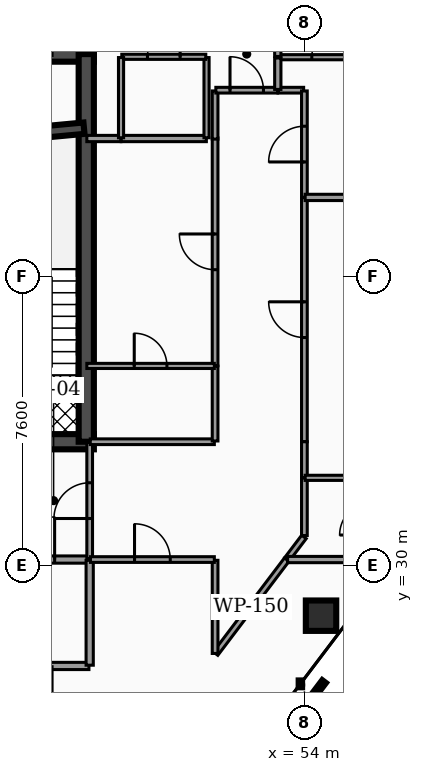
"""IFC4 building model, lengths in metres.
Left out: names, types, materials, properties, quantities, classifications, styles, units other than length and angle.
Written with IfcOpenShell. Run it as: python <this file> out.ifc"""

import sys

from ifc_helpers import new_model, si_unit, direction, frame, frame_2d, origin, origin_2d, place, context, subcontext, project, spatial, rectangle, hollow_rectangle, extrude, element, fill, save


model = new_model("IFC4")
c1 = context("Model", 3, precision=1e-05, world=origin(), true_north=direction((0.0, 1.0)))
c2 = subcontext(c1, "Body", "Model", "MODEL_VIEW")
j1 = project(units=[si_unit("LENGTHUNIT", "METRE"), si_unit("PLANEANGLEUNIT", "RADIAN")], contexts=[c1])
p1 = place(None, origin())
s1 = spatial("IfcSite", under=j1, at=p1, CompositionType="ELEMENT")
p2 = place(p1, origin())
s2 = spatial("IfcBuilding", under=s1, at=p2, CompositionType="ELEMENT")
p3 = place(p2, frame((0.0, 0.0, 123.42)))
s3 = spatial("IfcBuildingStorey", under=s2, at=p3, CompositionType="ELEMENT", Elevation=123.42)
p4 = place(p3, frame((28.4, 43.45, 0.0), z_axis=(0.0, 0.0, 1.0), x_axis=(1.0, 0.0, 0.0)))
e1 = element("IfcWall", 1, at=p4, inside=s3, PredefinedType="SHEAR", context=c2, shape_type="SweptSolid", body=[
    extrude(rectangle(XDim=20.06, YDim=0.4, at=frame_2d((10.03, 0.0))), origin(), (0.0, 0.0, 1.0), 3.5),
])
p5 = place(p3, frame((28.4, 33.25, 0.0), z_axis=(0.0, 0.0, 1.0), x_axis=(1.0, 0.0, 0.0)))
e2 = element("IfcWall", 2, at=p5, inside=s3, PredefinedType="SHEAR", context=c2, shape_type="SweptSolid", body=[
    extrude(rectangle(XDim=20.06, YDim=0.4, at=frame_2d((10.03, 0.0))), origin(), (0.0, 0.0, 1.0), 3.5),
])
p6 = place(p5, frame((4.03, 0.0, 0.0)))
e3 = element("IfcOpeningElement", 3, at=p6, cuts=e2, PredefinedType="OPENING", context=c2, shape_type="SweptSolid", body=[
    extrude(rectangle(XDim=1.1, YDim=2.15, at=frame_2d((0.55, 1.075))), frame((0.0, 0.21, 0.0), z_axis=(0.0, -1.0, 0.0), x_axis=(1.0, 0.0, 0.0)), (0.0, 0.0, 1.0), 0.42),
])
p7 = place(p5, frame((14.87, 0.0, 0.0)))
e4 = element("IfcOpeningElement", 4, at=p7, cuts=e2, PredefinedType="OPENING", context=c2, shape_type="SweptSolid", body=[
    extrude(rectangle(XDim=1.1, YDim=2.15, at=frame_2d((0.55, 1.075))), frame((0.0, 0.21, 0.0), z_axis=(0.0, -1.0, 0.0), x_axis=(1.0, 0.0, 0.0)), (0.0, 0.0, 1.0), 0.42),
])
p8 = place(p5, frame((5.95, 0.0, 0.0)))
e5 = element("IfcOpeningElement", 5, at=p8, cuts=e2, PredefinedType="OPENING", context=c2, shape_type="SweptSolid", body=[
    extrude(rectangle(XDim=1.0, YDim=2.1, at=frame_2d((0.5, 1.05))), frame((0.0, 0.21, 0.0), z_axis=(0.0, -1.0, 0.0), x_axis=(1.0, 0.0, 0.0)), (0.0, 0.0, 1.0), 0.42),
])
p9 = place(p5, frame((7.65, 0.0, 0.0)))
e6 = element("IfcOpeningElement", 6, at=p9, cuts=e2, PredefinedType="OPENING", context=c2, shape_type="SweptSolid", body=[
    extrude(rectangle(XDim=1.0, YDim=2.1, at=frame_2d((0.5, 1.05))), frame((0.0, 0.21, 0.0), z_axis=(0.0, -1.0, 0.0), x_axis=(1.0, 0.0, 0.0)), (0.0, 0.0, 1.0), 0.42),
])
p10 = place(p5, frame((1.31, 0.0, 0.0)))
e7 = element("IfcOpeningElement", 7, at=p10, cuts=e2, PredefinedType="OPENING", context=c2, shape_type="SweptSolid", body=[
    extrude(rectangle(XDim=1.1, YDim=2.2, at=frame_2d((0.55, 1.1))), frame((0.0, 0.21, 0.0), z_axis=(0.0, -1.0, 0.0), x_axis=(1.0, 0.0, 0.0)), (0.0, 0.0, 1.0), 0.42),
])
p11 = place(p5, frame((9.44, 0.0, 0.0)))
e8 = element("IfcOpeningElement", 8, at=p11, cuts=e2, PredefinedType="OPENING", context=c2, shape_type="SweptSolid", body=[
    extrude(rectangle(XDim=1.12, YDim=2.05, at=frame_2d((0.56, 1.025))), frame((0.0, 0.21, 0.0), z_axis=(0.0, -1.0, 0.0), x_axis=(1.0, 0.0, 0.0)), (0.0, 0.0, 1.0), 0.42),
])
p12 = place(p5, frame((17.65, 0.0, 0.0)))
e9 = element("IfcOpeningElement", 9, at=p12, cuts=e2, PredefinedType="OPENING", context=c2, shape_type="SweptSolid", body=[
    extrude(rectangle(XDim=1.1, YDim=2.2, at=frame_2d((0.55, 1.1))), frame((0.0, 0.21, 0.0), z_axis=(0.0, -1.0, 0.0), x_axis=(1.0, 0.0, 0.0)), (0.0, 0.0, 1.0), 0.42),
])
p13 = place(p3, frame((48.26, 33.25, 0.0), z_axis=(0.0, 0.0, 1.0), x_axis=(0.0, 1.0, 0.0)))
e10 = element("IfcWall", 10, at=p13, inside=s3, PredefinedType="SHEAR", context=c2, shape_type="SweptSolid", body=[
    extrude(rectangle(XDim=10.2, YDim=0.4, at=frame_2d((5.1, 0.0))), origin(), (0.0, 0.0, 1.0), 3.5),
])
p14 = place(p3, frame((44.98, 41.2, 0.0), z_axis=(0.0, 0.0, 1.0), x_axis=(0.995686468965, 0.09278176286, 0.0)))
e11 = element("IfcWall", 11, at=p14, inside=s3, PredefinedType="SHEAR", context=c2, shape_type="SweptSolid", body=[
    extrude(rectangle(XDim=3.234, YDim=0.3, at=frame_2d((1.617, 0.0))), origin(), (0.0, 0.0, 1.0), 3.5),
])
p15 = place(p3, frame((54.438, 28.673, 0.0), z_axis=(0.0, 0.0, 1.0), x_axis=(1.0, 0.0, 0.0)))
e12 = element("IfcColumn", 12, at=p15, inside=s3, PredefinedType="COLUMN", context=c2, shape_type="SweptSolid", body=[
    extrude(hollow_rectangle(XDim=0.8, YDim=0.8, WallThickness=0.04, at=origin_2d()), origin(), (0.0, 0.0, 1.0), 3.5),
])
p16 = place(p3, frame((45.405, 30.15, 0.0), z_axis=(0.0, 0.0, 1.0), x_axis=(1.0, 0.0, 0.0)))
e13 = element("IfcWall", 13, at=p16, inside=s3, PredefinedType="PARTITIONING", context=c2, shape_type="SweptSolid", body=[
    extrude(rectangle(XDim=2.925, YDim=0.19, at=frame_2d((1.462, 0.0))), origin(), (0.0, 0.0, 1.0), 2.457),
])
p17 = place(p16, frame((0.903, 0.0, 0.0)))
e14 = element("IfcOpeningElement", 14, at=p17, cuts=e13, PredefinedType="OPENING", context=c2, shape_type="SweptSolid", body=[
    extrude(rectangle(XDim=1.12, YDim=2.05, at=frame_2d((0.56, 1.025))), frame((0.0, 0.105, 0.0), z_axis=(0.0, -1.0, 0.0), x_axis=(1.0, 0.0, 0.0)), (0.0, 0.0, 1.0), 0.21),
])
p18 = place(p3, frame((48.35, 30.17, 0.0), z_axis=(0.0, 0.0, 1.0), x_axis=(0.0, 1.0, 0.0)))
e15 = element("IfcWall", 15, at=p18, inside=s3, PredefinedType="PARTITIONING", context=c2, shape_type="SweptSolid", body=[
    extrude(rectangle(XDim=3.06, YDim=0.15, at=frame_2d((1.53, 0.0))), origin(), (0.0, 0.0, 1.0), 2.457),
])
p19 = place(p18, frame((1.06, 0.0, 0.0)))
e16 = element("IfcOpeningElement", 16, at=p19, cuts=e15, PredefinedType="OPENING", context=c2, shape_type="SweptSolid", body=[
    extrude(rectangle(XDim=0.94, YDim=2.05, at=frame_2d((0.47, 1.025))), frame((0.0, 0.085, 0.0), z_axis=(0.0, -1.0, 0.0), x_axis=(1.0, 0.0, 0.0)), (0.0, 0.0, 1.0), 0.17),
])
p20 = place(p3, frame((47.305, 27.35, 0.0), z_axis=(0.0, 0.0, 1.0), x_axis=(1.0, 0.0, 0.0)))
e17 = element("IfcWall", 17, at=p20, inside=s3, PredefinedType="PARTITIONING", context=c2, shape_type="SweptSolid", body=[
    extrude(rectangle(XDim=1.025, YDim=0.19, at=frame_2d((0.513, 0.0))), origin(), (0.0, 0.0, 1.0), 2.457),
])
p21 = place(p3, frame((48.35, 27.37, 0.0), z_axis=(0.0, 0.0, 1.0), x_axis=(0.0, 1.0, 0.0)))
e18 = element("IfcWall", 18, at=p21, inside=s3, PredefinedType="PARTITIONING", context=c2, shape_type="SweptSolid", body=[
    extrude(rectangle(XDim=2.76, YDim=0.19, at=frame_2d((1.38, 0.0))), origin(), (0.0, 0.0, 1.0), 2.457),
])
p22 = place(p3, frame((51.662, 27.675, 0.0), z_axis=(0.0, 0.0, 1.0), x_axis=(0.603831940294, 0.797111653334, 0.0)))
e19 = element("IfcWall", 19, at=p22, inside=s3, PredefinedType="PARTITIONING", context=c2, shape_type="SweptSolid", body=[
    extrude(rectangle(XDim=3.104, YDim=0.15, at=frame_2d((1.552, 0.0))), origin(), (0.0, 0.0, 1.0), 2.457),
])
p23 = place(p3, frame((51.65, 27.679, 0.0), z_axis=(0.0, 0.0, 1.0), x_axis=(0.0, 1.0, 0.0)))
e20 = element("IfcWall", 20, at=p23, inside=s3, PredefinedType="PARTITIONING", context=c2, shape_type="SweptSolid", body=[
    extrude(rectangle(XDim=2.451, YDim=0.15, at=frame_2d((1.225, 0.0))), origin(), (0.0, 0.0, 1.0), 2.457),
])
p24 = place(p3, frame((48.37, 30.15, 0.0), z_axis=(0.0, 0.0, 1.0), x_axis=(1.0, 0.0, 0.0)))
e21 = element("IfcWall", 21, at=p24, inside=s3, PredefinedType="PARTITIONING", context=c2, shape_type="SweptSolid", body=[
    extrude(rectangle(XDim=3.26, YDim=0.15, at=frame_2d((1.63, 0.0))), origin(), (0.0, 0.0, 1.0), 2.457),
])
p25 = place(p24, frame((1.16, 0.0, 0.0)))
e22 = element("IfcOpeningElement", 22, at=p25, cuts=e21, PredefinedType="OPENING", context=c2, shape_type="SweptSolid", body=[
    extrude(rectangle(XDim=0.94, YDim=2.05, at=frame_2d((0.47, 1.025))), frame((0.0, 0.085, 0.0), z_axis=(0.0, -1.0, 0.0), x_axis=(1.0, 0.0, 0.0)), (0.0, 0.0, 1.0), 0.17),
])
p26 = place(p3, frame((54.0, 33.25, 0.0), z_axis=(0.0, 0.0, 1.0), x_axis=(0.0, 1.0, 0.0)))
e23 = element("IfcWall", 23, at=p26, inside=s3, PredefinedType="PARTITIONING", context=c2, shape_type="SweptSolid", body=[
    extrude(rectangle(XDim=6.423, YDim=0.15, at=frame_2d((3.212, 0.0))), origin(), (0.0, 0.0, 1.0), 2.457),
])
p27 = place(p26, frame((2.742, 0.0, 0.0)))
e24 = element("IfcOpeningElement", 24, at=p27, cuts=e23, PredefinedType="OPENING", context=c2, shape_type="SweptSolid", body=[
    extrude(rectangle(XDim=0.94, YDim=2.05, at=frame_2d((0.47, 1.025))), frame((0.0, 0.085, 0.0), z_axis=(0.0, -1.0, 0.0), x_axis=(1.0, 0.0, 0.0)), (0.0, 0.0, 1.0), 0.17),
])
p28 = place(p3, frame((54.0, 32.305, 0.0), z_axis=(0.0, 0.0, 1.0), x_axis=(0.0, 1.0, 0.0)))
e25 = element("IfcWall", 25, at=p28, inside=s3, PredefinedType="PARTITIONING", context=c2, shape_type="SweptSolid", body=[
    extrude(rectangle(XDim=0.945, YDim=0.15, at=frame_2d((0.473, 0.0))), origin(), (0.0, 0.0, 1.0), 2.457),
])
p29 = place(p3, frame((54.0, 30.781, 0.0), z_axis=(0.0, 0.0, 1.0), x_axis=(0.0, 1.0, 0.0)))
e26 = element("IfcWall", 26, at=p29, inside=s3, PredefinedType="PARTITIONING", context=c2, shape_type="SweptSolid", body=[
    extrude(rectangle(XDim=1.514, YDim=0.15, at=frame_2d((0.757, 0.0))), origin(), (0.0, 0.0, 1.0), 2.457),
])
p30 = place(p3, frame((53.54, 30.154, 0.0), z_axis=(0.0, 0.0, 1.0), x_axis=(0.603680225987, 0.797226557982, 0.0)))
e27 = element("IfcWall", 27, at=p30, inside=s3, PredefinedType="PARTITIONING", context=c2, shape_type="SweptSolid", body=[
    extrude(rectangle(XDim=0.742, YDim=0.15, at=frame_2d((0.371, 0.0))), origin(), (0.0, 0.0, 1.0), 2.457),
])
p31 = place(p3, frame((53.305, 42.5, 0.0), z_axis=(0.0, 0.0, 1.0), x_axis=(1.0, 0.0, 0.0)))
e28 = element("IfcWall", 28, at=p31, inside=s3, PredefinedType="PARTITIONING", context=c2, shape_type="SweptSolid", body=[
    extrude(rectangle(XDim=0.675, YDim=0.15, at=frame_2d((0.337, 0.0))), origin(), (0.0, 0.0, 1.0), 2.457),
])
p32 = place(p3, frame((54.0, 39.683, 0.0), z_axis=(0.0, 0.0, 1.0), x_axis=(0.0, 1.0, 0.0)))
e29 = element("IfcWall", 29, at=p32, inside=s3, PredefinedType="PARTITIONING", context=c2, shape_type="SweptSolid", body=[
    extrude(rectangle(XDim=2.797, YDim=0.15, at=frame_2d((1.398, 0.0))), origin(), (0.0, 0.0, 1.0), 2.457),
])
p33 = place(p32, frame((0.928, 0.0, 0.0)))
e30 = element("IfcOpeningElement", 30, at=p33, cuts=e29, PredefinedType="OPENING", context=c2, shape_type="SweptSolid", body=[
    extrude(rectangle(XDim=0.94, YDim=2.05, at=frame_2d((0.47, 1.025))), frame((0.0, 0.085, 0.0), z_axis=(0.0, -1.0, 0.0), x_axis=(1.0, 0.0, 0.0)), (0.0, 0.0, 1.0), 0.17),
])
p34 = place(p3, frame((51.65, 35.25, 0.0), z_axis=(0.0, 0.0, 1.0), x_axis=(0.0, 1.0, 0.0)))
e31 = element("IfcWall", 31, at=p34, inside=s3, PredefinedType="PARTITIONING", context=c2, shape_type="SweptSolid", body=[
    extrude(rectangle(XDim=5.994, YDim=0.15, at=frame_2d((2.997, 0.0))), origin(), (0.0, 0.0, 1.0), 2.457),
])
p35 = place(p34, frame((2.527, 0.0, 0.0)))
e32 = element("IfcOpeningElement", 32, at=p35, cuts=e31, PredefinedType="OPENING", context=c2, shape_type="SweptSolid", body=[
    extrude(rectangle(XDim=0.94, YDim=2.05, at=frame_2d((0.47, 1.025))), frame((0.0, 0.085, 0.0), z_axis=(0.0, -1.0, 0.0), x_axis=(1.0, 0.0, 0.0)), (0.0, 0.0, 1.0), 0.17),
])
p36 = place(p3, frame((48.365, 33.25, 0.0), z_axis=(0.0, 0.0, 1.0), x_axis=(1.0, 0.0, 0.0)))
e33 = element("IfcWall", 33, at=p36, inside=s3, PredefinedType="PARTITIONING", context=c2, shape_type="SweptSolid", body=[
    extrude(rectangle(XDim=3.265, YDim=0.15, at=frame_2d((1.632, 0.0))), origin(), (0.0, 0.0, 1.0), 2.457),
])
p37 = place(p3, frame((51.65, 33.27, 0.0), z_axis=(0.0, 0.0, 1.0), x_axis=(0.0, 1.0, 0.0)))
e34 = element("IfcWall", 34, at=p37, inside=s3, PredefinedType="PARTITIONING", context=c2, shape_type="SweptSolid", body=[
    extrude(rectangle(XDim=1.969, YDim=0.15, at=frame_2d((0.985, 0.0))), origin(), (0.0, 0.0, 1.0), 2.457),
])
p38 = place(p3, frame((51.65, 41.213, 0.0), z_axis=(0.0, 0.0, 1.0), x_axis=(0.0, 1.0, 0.0)))
e35 = element("IfcWall", 35, at=p38, inside=s3, PredefinedType="PARTITIONING", context=c2, shape_type="SweptSolid", body=[
    extrude(rectangle(XDim=1.267, YDim=0.15, at=frame_2d((0.633, 0.0))), origin(), (0.0, 0.0, 1.0), 2.457),
])
p39 = place(p3, frame((51.67, 42.5, 0.0), z_axis=(0.0, 0.0, 1.0), x_axis=(1.0, 0.0, 0.0)))
e36 = element("IfcWall", 36, at=p39, inside=s3, PredefinedType="PARTITIONING", context=c2, shape_type="SweptSolid", body=[
    extrude(rectangle(XDim=1.625, YDim=0.15, at=frame_2d((0.812, 0.0))), origin(), (0.0, 0.0, 1.0), 2.457),
])
p40 = place(p39, frame((0.373, 0.0, 0.0)))
e37 = element("IfcOpeningElement", 37, at=p40, cuts=e36, PredefinedType="OPENING", context=c2, shape_type="SweptSolid", body=[
    extrude(rectangle(XDim=0.88, YDim=2.05, at=frame_2d((0.44, 1.025))), frame((0.0, 0.085, 0.0), z_axis=(0.0, -1.0, 0.0), x_axis=(1.0, 0.0, 0.0)), (0.0, 0.0, 1.0), 0.17),
])
p41 = place(p3, frame((47.3, 25.292, 0.0), z_axis=(0.0, 0.0, 1.0), x_axis=(0.0, 1.0, 0.0)))
e38 = element("IfcWall", 38, at=p41, inside=s3, PredefinedType="PARTITIONING", context=c2, shape_type="SweptSolid", body=[
    extrude(rectangle(XDim=2.038, YDim=0.12, at=frame_2d((1.019, 0.0))), origin(), (0.0, 0.0, 1.0), 2.457),
])
p42 = place(p3, frame((47.3, 43.415, 0.0), z_axis=(0.0, 0.0, 1.0), x_axis=(0.0, 1.0, 0.0)))
e39 = element("IfcWall", 39, at=p42, inside=s3, PredefinedType="PARTITIONING", context=c2, shape_type="SweptSolid", body=[
    extrude(rectangle(XDim=5.837, YDim=0.12, at=frame_2d((2.918, 0.0))), origin(), (0.0, 0.0, 1.0), 2.457),
])
p43 = place(p3, frame((53.557, 30.15, 0.0), z_axis=(0.0, 0.0, 1.0), x_axis=(1.0, 0.0, 0.0)))
e40 = element("IfcWall", 40, at=p43, inside=s3, PredefinedType="PARTITIONING", context=c2, shape_type="SweptSolid", body=[
    extrude(rectangle(XDim=2.225, YDim=0.165, at=frame_2d((1.113, 0.0))), origin(), (0.0, 0.0, 1.0), 2.457),
])
p44 = place(p3, frame((54.02, 32.3, 0.0), z_axis=(0.0, 0.0, 1.0), x_axis=(1.0, 0.0, 0.0)))
e41 = element("IfcWall", 41, at=p44, inside=s3, PredefinedType="PARTITIONING", context=c2, shape_type="SweptSolid", body=[
    extrude(rectangle(XDim=1.747, YDim=0.135, at=frame_2d((0.874, 0.0))), origin(), (0.0, 0.0, 1.0), 2.457),
])
p45 = place(p3, frame((54.02, 39.678, 0.0), z_axis=(0.0, 0.0, 1.0), x_axis=(1.0, 0.0, 0.0)))
e42 = element("IfcWall", 42, at=p45, inside=s3, PredefinedType="PARTITIONING", context=c2, shape_type="SweptSolid", body=[
    extrude(rectangle(XDim=7.967, YDim=0.165, at=frame_2d((3.983, 0.0))), origin(), (0.0, 0.0, 1.0), 2.457),
])
p46 = place(p3, frame((53.32, 43.367, 0.0), z_axis=(0.0, 0.0, 1.0), x_axis=(1.0, 0.0, 0.0)))
e43 = element("IfcWall", 43, at=p46, inside=s3, PredefinedType="PARTITIONING", context=c2, shape_type="SweptSolid", body=[
    extrude(rectangle(XDim=2.21, YDim=0.135, at=frame_2d((1.105, 0.0))), origin(), (0.0, 0.0, 1.0), 2.457),
])
p47 = place(p46, frame((0.875, 0.0, 0.0)))
e44 = element("IfcOpeningElement", 44, at=p47, cuts=e43, PredefinedType="OPENING", context=c2, shape_type="SweptSolid", body=[
    extrude(rectangle(XDim=0.86, YDim=2.05, at=frame_2d((0.43, 1.025))), frame((0.0, 0.077, 0.0), z_axis=(0.0, -1.0, 0.0), x_axis=(1.0, 0.0, 0.0)), (0.0, 0.0, 1.0), 0.155),
])
p48 = place(p3, frame((53.3, 42.52, 0.0), z_axis=(0.0, 0.0, 1.0), x_axis=(0.0, 1.0, 0.0)))
e45 = element("IfcWall", 45, at=p48, inside=s3, PredefinedType="PARTITIONING", context=c2, shape_type="SweptSolid", body=[
    extrude(rectangle(XDim=0.827, YDim=0.165, at=frame_2d((0.414, 0.0))), origin(), (0.0, 0.0, 1.0), 2.457),
])
p49 = place(p3, frame((53.3, 43.387, 0.0), z_axis=(0.0, 0.0, 1.0), x_axis=(0.0, 1.0, 0.0)))
e46 = element("IfcWall", 46, at=p49, inside=s3, PredefinedType="PARTITIONING", context=c2, shape_type="SweptSolid", body=[
    extrude(rectangle(XDim=2.11, YDim=0.165, at=frame_2d((1.055, 0.0))), origin(), (0.0, 0.0, 1.0), 2.457),
])
p50 = place(p3, frame((48.275, 35.245, 0.0), z_axis=(0.0, 0.0, 1.0), x_axis=(1.0, 0.0, 0.0)))
e47 = element("IfcWall", 47, at=p50, inside=s3, PredefinedType="PARTITIONING", context=c2, shape_type="SweptSolid", body=[
    extrude(rectangle(XDim=3.355, YDim=0.135, at=frame_2d((1.677, 0.0))), origin(), (0.0, 0.0, 1.0), 2.457),
])
p51 = place(p50, frame((1.248, 0.0, 0.0)))
e48 = element("IfcOpeningElement", 48, at=p51, cuts=e47, PredefinedType="OPENING", context=c2, shape_type="SweptSolid", body=[
    extrude(rectangle(XDim=0.86, YDim=2.05, at=frame_2d((0.43, 1.025))), frame((0.0, 0.077, 0.0), z_axis=(0.0, -1.0, 0.0), x_axis=(1.0, 0.0, 0.0)), (0.0, 0.0, 1.0), 0.155),
])
p52 = place(p3, frame((48.275, 41.228, 0.0), z_axis=(0.0, 0.0, 1.0), x_axis=(1.0, 0.0, 0.0)))
e49 = element("IfcWall", 49, at=p52, inside=s3, PredefinedType="PARTITIONING", context=c2, shape_type="SweptSolid", body=[
    extrude(rectangle(XDim=0.895, YDim=0.165, at=frame_2d((0.448, 0.0))), origin(), (0.0, 0.0, 1.0), 2.457),
])
p53 = place(p3, frame((49.18, 41.228, 0.0), z_axis=(0.0, 0.0, 1.0), x_axis=(1.0, 0.0, 0.0)))
e50 = element("IfcWall", 50, at=p53, inside=s3, PredefinedType="PARTITIONING", context=c2, shape_type="SweptSolid", body=[
    extrude(rectangle(XDim=2.24, YDim=0.165, at=frame_2d((1.12, 0.0))), origin(), (0.0, 0.0, 1.0), 2.457),
])
p54 = place(p3, frame((51.425, 41.248, 0.0), z_axis=(0.0, 0.0, 1.0), x_axis=(0.0, 1.0, 0.0)))
e51 = element("IfcWall", 51, at=p54, inside=s3, PredefinedType="PARTITIONING", context=c2, shape_type="SweptSolid", body=[
    extrude(rectangle(XDim=2.11, YDim=0.135, at=frame_2d((1.055, 0.0))), origin(), (0.0, 0.0, 1.0), 2.457),
])
p55 = place(p3, frame((49.195, 43.378, 0.0), z_axis=(0.0, 0.0, 1.0), x_axis=(1.0, 0.0, 0.0)))
e52 = element("IfcWall", 52, at=p55, inside=s3, PredefinedType="PARTITIONING", context=c2, shape_type="SweptSolid", body=[
    extrude(rectangle(XDim=2.21, YDim=0.135, at=frame_2d((1.105, 0.0))), origin(), (0.0, 0.0, 1.0), 2.457),
])
p56 = place(p55, frame((0.675, 0.0, 0.0)))
e53 = element("IfcOpeningElement", 53, at=p56, cuts=e52, PredefinedType="OPENING", context=c2, shape_type="SweptSolid", body=[
    extrude(rectangle(XDim=0.86, YDim=2.05, at=frame_2d((0.43, 1.025))), frame((0.0, 0.077, 0.0), z_axis=(0.0, -1.0, 0.0), x_axis=(1.0, 0.0, 0.0)), (0.0, 0.0, 1.0), 0.155),
])
p57 = place(p3, frame((49.175, 41.248, 0.0), z_axis=(0.0, 0.0, 1.0), x_axis=(0.0, 1.0, 0.0)))
e54 = element("IfcWall", 54, at=p57, inside=s3, PredefinedType="PARTITIONING", context=c2, shape_type="SweptSolid", body=[
    extrude(rectangle(XDim=2.11, YDim=0.135, at=frame_2d((1.055, 0.0))), origin(), (0.0, 0.0, 1.0), 2.457),
])
p58 = place(p17, origin())
e55 = element("IfcDoor", 55, at=p58, inside=s3, OperationType="SINGLE_SWING_RIGHT", PredefinedType="DOOR", context=c2, shape_type="SweptSolid", body=[
    extrude(rectangle(XDim=1.12, YDim=2.05, at=frame_2d((0.56, 1.025))), frame((0.0, 0.025, 0.0), z_axis=(0.0, -1.0, 0.0), x_axis=(1.0, 0.0, 0.0)), (0.0, 0.0, 1.0), 0.05),
])
fill(e14, e55)
p59 = place(p19, origin())
e56 = element("IfcDoor", 56, at=p59, inside=s3, OperationType="SINGLE_SWING_LEFT", PredefinedType="DOOR", context=c2, shape_type="SweptSolid", body=[
    extrude(rectangle(XDim=0.94, YDim=2.05, at=frame_2d((0.47, 1.025))), frame((0.0, 0.025, 0.0), z_axis=(0.0, -1.0, 0.0), x_axis=(1.0, 0.0, 0.0)), (0.0, 0.0, 1.0), 0.05),
])
fill(e16, e56)
p60 = place(p25, origin())
e57 = element("IfcDoor", 57, at=p60, inside=s3, OperationType="SINGLE_SWING_LEFT", PredefinedType="DOOR", context=c2, shape_type="SweptSolid", body=[
    extrude(rectangle(XDim=0.94, YDim=2.05, at=frame_2d((0.47, 1.025))), frame((0.0, 0.025, 0.0), z_axis=(0.0, -1.0, 0.0), x_axis=(1.0, 0.0, 0.0)), (0.0, 0.0, 1.0), 0.05),
])
fill(e22, e57)
p61 = place(p27, origin())
e58 = element("IfcDoor", 58, at=p61, inside=s3, OperationType="SINGLE_SWING_RIGHT", PredefinedType="DOOR", context=c2, shape_type="SweptSolid", body=[
    extrude(rectangle(XDim=0.94, YDim=2.05, at=frame_2d((0.47, 1.025))), frame((0.0, 0.025, 0.0), z_axis=(0.0, -1.0, 0.0), x_axis=(1.0, 0.0, 0.0)), (0.0, 0.0, 1.0), 0.05),
])
fill(e24, e58)
p62 = place(p33, origin())
e59 = element("IfcDoor", 59, at=p62, inside=s3, OperationType="SINGLE_SWING_LEFT", PredefinedType="DOOR", context=c2, shape_type="SweptSolid", body=[
    extrude(rectangle(XDim=0.94, YDim=2.05, at=frame_2d((0.47, 1.025))), frame((0.0, 0.025, 0.0), z_axis=(0.0, -1.0, 0.0), x_axis=(1.0, 0.0, 0.0)), (0.0, 0.0, 1.0), 0.05),
])
fill(e30, e59)
p63 = place(p35, origin())
e60 = element("IfcDoor", 60, at=p63, inside=s3, OperationType="SINGLE_SWING_RIGHT", PredefinedType="DOOR", context=c2, shape_type="SweptSolid", body=[
    extrude(rectangle(XDim=0.94, YDim=2.05, at=frame_2d((0.47, 1.025))), frame((0.0, 0.025, 0.0), z_axis=(0.0, -1.0, 0.0), x_axis=(1.0, 0.0, 0.0)), (0.0, 0.0, 1.0), 0.05),
])
fill(e32, e60)
p64 = place(p40, origin())
e61 = element("IfcDoor", 61, at=p64, inside=s3, OperationType="SINGLE_SWING_LEFT", PredefinedType="DOOR", context=c2, shape_type="SweptSolid", body=[
    extrude(rectangle(XDim=0.88, YDim=2.05, at=frame_2d((0.44, 1.025))), frame((0.0, 0.025, 0.0), z_axis=(0.0, -1.0, 0.0), x_axis=(1.0, 0.0, 0.0)), (0.0, 0.0, 1.0), 0.05),
])
fill(e37, e61)
p65 = place(p47, origin())
e62 = element("IfcDoor", 62, at=p65, inside=s3, OperationType="SINGLE_SWING_RIGHT", PredefinedType="DOOR", context=c2, shape_type="SweptSolid", body=[
    extrude(rectangle(XDim=0.86, YDim=2.05, at=frame_2d((0.43, 1.025))), frame((0.0, 0.025, 0.0), z_axis=(0.0, -1.0, 0.0), x_axis=(1.0, 0.0, 0.0)), (0.0, 0.0, 1.0), 0.05),
])
fill(e44, e62)
p66 = place(p51, origin())
e63 = element("IfcDoor", 63, at=p66, inside=s3, OperationType="SINGLE_SWING_LEFT", PredefinedType="DOOR", context=c2, shape_type="SweptSolid", body=[
    extrude(rectangle(XDim=0.86, YDim=2.05, at=frame_2d((0.43, 1.025))), frame((0.0, 0.025, 0.0), z_axis=(0.0, -1.0, 0.0), x_axis=(1.0, 0.0, 0.0)), (0.0, 0.0, 1.0), 0.05),
])
fill(e48, e63)
p67 = place(p56, origin())
e64 = element("IfcDoor", 64, at=p67, inside=s3, OperationType="SINGLE_SWING_RIGHT", PredefinedType="DOOR", context=c2, shape_type="SweptSolid", body=[
    extrude(rectangle(XDim=0.86, YDim=2.05, at=frame_2d((0.43, 1.025))), frame((0.0, 0.025, 0.0), z_axis=(0.0, -1.0, 0.0), x_axis=(1.0, 0.0, 0.0)), (0.0, 0.0, 1.0), 0.05),
])
fill(e53, e64)
save(model, sys.argv[1])
